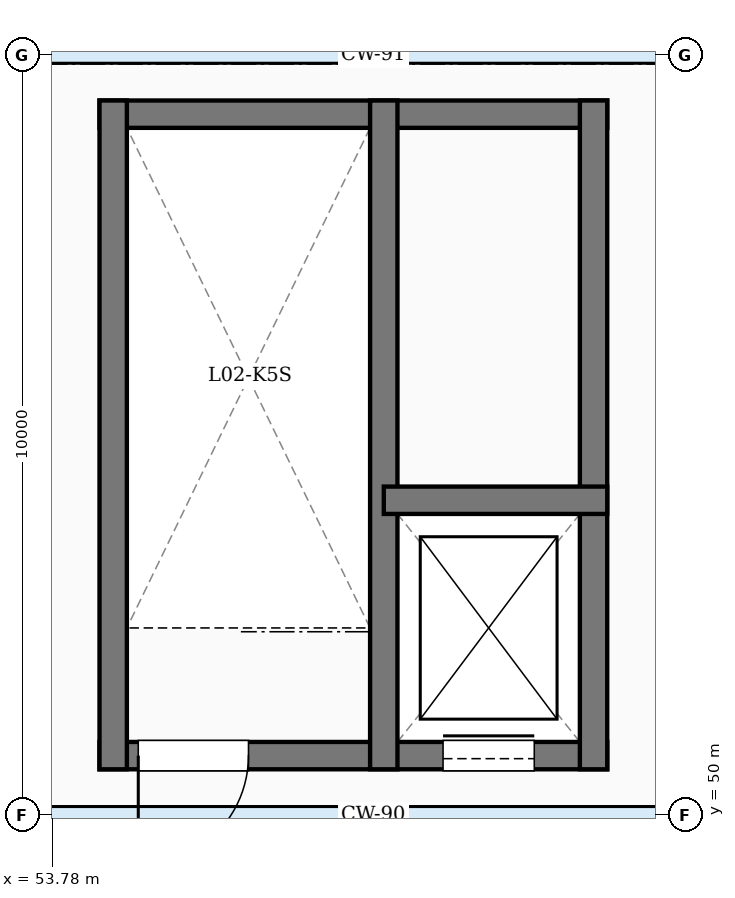
"""IFC4 building model, lengths in metres.
Left out: names, types, materials, properties, quantities, classifications, styles, units other than length and angle.
Written with IfcOpenShell. Run it as: python <this file> out.ifc"""

import sys

from ifc_helpers import new_model, si_unit, direction, frame, frame_2d, origin, place, context, subcontext, project, spatial, rectangle, extrude, element, fill, save


model = new_model("IFC4")
c1 = context("Model", 3, precision=1e-05, world=origin(), true_north=direction((0.0, 1.0)))
c2 = subcontext(c1, "Body", "Model", "MODEL_VIEW")
j1 = project(units=[si_unit("LENGTHUNIT", "METRE"), si_unit("PLANEANGLEUNIT", "RADIAN")], contexts=[c1])
p1 = place(None, origin())
s1 = spatial("IfcSite", under=j1, at=p1, CompositionType="ELEMENT")
p2 = place(p1, origin())
s2 = spatial("IfcBuilding", under=s1, at=p2, CompositionType="ELEMENT")
p3 = place(p2, frame((0.0, 0.0, 10.2)))
s3 = spatial("IfcBuildingStorey", under=s2, at=p3, CompositionType="ELEMENT", Elevation=10.2)
p4 = place(p3, frame((54.4, 50.78, 0.0), z_axis=(0.0, 0.0, 1.0), x_axis=(1.0, 0.0, 0.0)))
e1 = element("IfcWall", 1, at=p4, inside=s3, PredefinedType="SHEAR", context=c2, shape_type="SweptSolid", body=[
    extrude(rectangle(XDim=6.68, YDim=0.36, at=frame_2d((3.34, 0.0))), origin(), (0.0, 0.0, 1.0), 4.2),
])
p5 = place(p4, frame((0.51, 0.0, 0.0)))
e2 = element("IfcOpeningElement", 2, at=p5, cuts=e1, PredefinedType="OPENING", context=c2, shape_type="SweptSolid", body=[
    extrude(rectangle(XDim=1.45, YDim=2.4, at=frame_2d((0.725, 1.2))), frame((0.0, 0.19, 0.0), z_axis=(0.0, -1.0, 0.0), x_axis=(1.0, 0.0, 0.0)), (0.0, 0.0, 1.0), 0.38),
])
p6 = place(p4, frame((4.52, 0.0, 0.0)))
e3 = element("IfcOpeningElement", 3, at=p6, cuts=e1, PredefinedType="OPENING", context=c2, shape_type="SweptSolid", body=[
    extrude(rectangle(XDim=1.2, YDim=2.35, at=frame_2d((0.6, 1.175))), frame((0.0, 0.19, 0.0), z_axis=(0.0, -1.0, 0.0), x_axis=(1.0, 0.0, 0.0)), (0.0, 0.0, 1.0), 0.38),
])
p7 = place(p3, frame((54.4, 59.22, 0.0), z_axis=(0.0, 0.0, 1.0), x_axis=(1.0, 0.0, 0.0)))
e4 = element("IfcWall", 4, at=p7, inside=s3, PredefinedType="SHEAR", context=c2, shape_type="SweptSolid", body=[
    extrude(rectangle(XDim=6.68, YDim=0.36, at=frame_2d((3.34, 0.0))), origin(), (0.0, 0.0, 1.0), 4.2),
])
for number, where, z_axis, x_axis in (
    (5, (54.58, 50.6, 0.0), (0.0, 0.0, 1.0), (0.0, 1.0, 0.0)),
    (6, (60.9, 50.6, 0.0), (0.0, 0.0, 1.0), (0.0, 1.0, 0.0)),
    (7, (58.14, 50.6, 0.0), (0.0, 0.0, 1.0), (0.0, 1.0, 0.0)),
):
    element("IfcWall", number, at=place(p3, frame(where, z_axis=z_axis, x_axis=x_axis)), inside=s3, PredefinedType="SHEAR", context=c2, shape_type="SweptSolid", body=[
        extrude(rectangle(XDim=8.8, YDim=0.36, at=frame_2d((4.4, 0.0))), origin(), (0.0, 0.0, 1.0), 4.2),
    ])
p8 = place(p3, frame((58.14, 54.14, 0.0), z_axis=(0.0, 0.0, 1.0), x_axis=(1.0, 0.0, 0.0)))
e8 = element("IfcWall", 8, at=p8, inside=s3, PredefinedType="SHEAR", context=c2, shape_type="SweptSolid", body=[
    extrude(rectangle(XDim=2.94, YDim=0.36, at=frame_2d((1.47, 0.0))), origin(), (0.0, 0.0, 1.0), 4.2),
])
p9 = place(p5, origin())
e9 = element("IfcDoor", 9, at=p9, inside=s3, OperationType="SINGLE_SWING_LEFT", PredefinedType="DOOR", context=c2, shape_type="SweptSolid", body=[
    extrude(rectangle(XDim=1.45, YDim=2.4, at=frame_2d((0.725, 1.2))), frame((0.0, 0.025, 0.0), z_axis=(0.0, -1.0, 0.0), x_axis=(1.0, 0.0, 0.0)), (0.0, 0.0, 1.0), 0.05),
])
fill(e2, e9)
p10 = place(p6, origin())
e10 = element("IfcDoor", 10, at=p10, inside=s3, OperationType="SLIDING_TO_LEFT", PredefinedType="DOOR", context=c2, shape_type="SweptSolid", body=[
    extrude(rectangle(XDim=1.2, YDim=2.35, at=frame_2d((0.6, 1.175))), frame((0.0, 0.025, 0.0), z_axis=(0.0, -1.0, 0.0), x_axis=(1.0, 0.0, 0.0)), (0.0, 0.0, 1.0), 0.05),
])
fill(e3, e10)
save(model, sys.argv[1])
